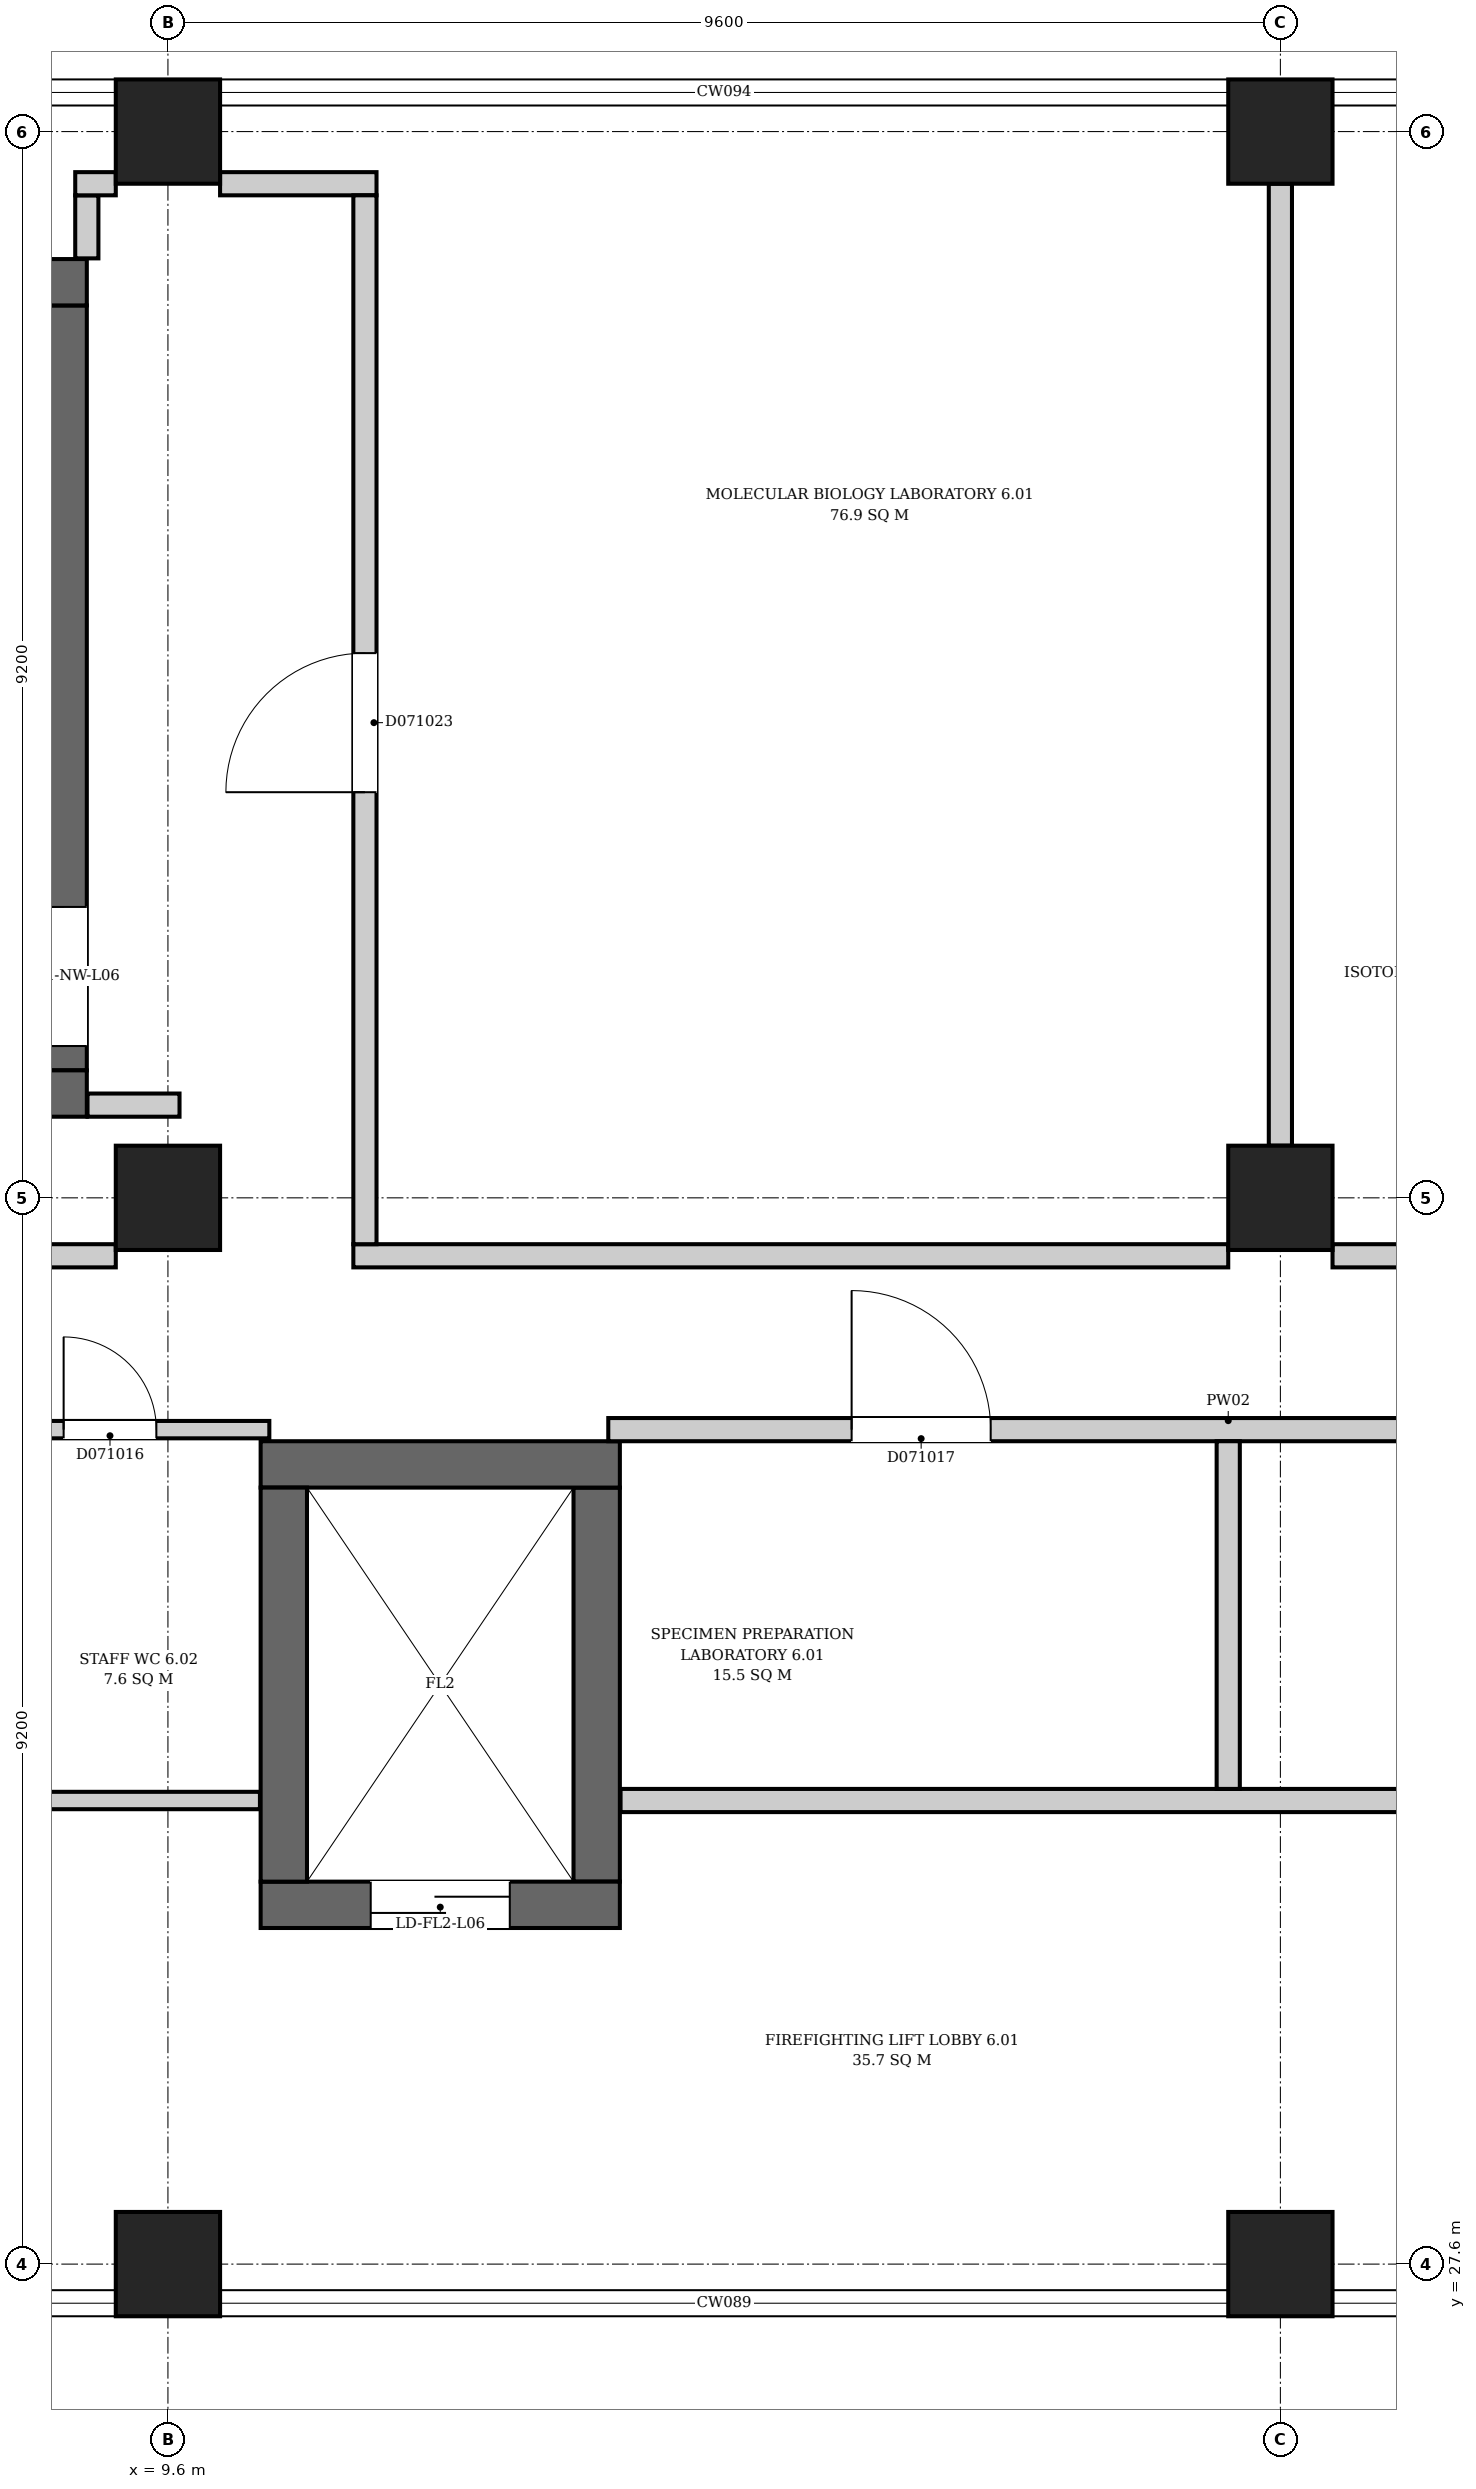
"""IFC4 building model, lengths in metres.
Left out: names, types, materials, properties, quantities, classifications, styles, units other than length and angle.
Written with IfcOpenShell. Run it as: python <this file> out.ifc"""

import sys

from ifc_helpers import new_model, si_unit, direction, frame, frame_2d, origin, origin_2d, place, context, subcontext, project, spatial, rectangle, extrude, element, fill, save


model = new_model("IFC4")
c1 = context("Model", 3, precision=1e-05, world=origin(), true_north=direction((0.0, 1.0)))
c2 = subcontext(c1, "Body", "Model", "MODEL_VIEW")
j1 = project(units=[si_unit("LENGTHUNIT", "METRE"), si_unit("PLANEANGLEUNIT", "RADIAN")], contexts=[c1])
p1 = place(None, origin())
s1 = spatial("IfcSite", under=j1, at=p1, CompositionType="ELEMENT")
p2 = place(p1, origin())
s2 = spatial("IfcBuilding", under=s1, at=p2, CompositionType="ELEMENT")
p3 = place(p2, frame((0.0, 0.0, 36.1)))
s3 = spatial("IfcBuildingStorey", under=s2, at=p3, CompositionType="ELEMENT", Elevation=36.1)
for number, where, z_axis, x_axis in (
    (1, (4.7, 37.7, 0.0), (0.0, 0.0, 1.0), (1.0, 0.0, 0.0)),
    (2, (4.7, 44.7, 0.0), (0.0, 0.0, 1.0), (1.0, 0.0, 0.0)),
):
    element("IfcWall", number, at=place(p3, frame(where, z_axis=z_axis, x_axis=x_axis)), inside=s3, PredefinedType="SHEAR", context=c2, shape_type="SweptSolid", body=[
        extrude(rectangle(XDim=4.2, YDim=0.4, at=frame_2d((2.1, 0.0))), origin(), (0.0, 0.0, 1.0), 4.2),
    ])
p4 = place(p3, frame((8.7, 37.9, 0.0), z_axis=(0.0, 0.0, 1.0), x_axis=(0.0, 1.0, 0.0)))
e3 = element("IfcWall", 3, at=p4, inside=s3, PredefinedType="SHEAR", context=c2, shape_type="SweptSolid", body=[
    extrude(rectangle(XDim=6.6, YDim=0.4, at=frame_2d((3.3, 0.0))), origin(), (0.0, 0.0, 1.0), 4.2),
])
p5 = place(p4, frame((0.21, 0.0, 0.0)))
e4 = element("IfcOpeningElement", 4, at=p5, cuts=e3, PredefinedType="OPENING", context=c2, shape_type="SweptSolid", body=[
    extrude(rectangle(XDim=1.2, YDim=2.1, at=frame_2d((0.6, 1.05))), frame((0.0, 0.21, 0.0), z_axis=(0.0, -1.0, 0.0), x_axis=(1.0, 0.0, 0.0)), (0.0, 0.0, 1.0), 0.42),
])
p6 = place(p3, frame((10.4, 30.7, 0.0), z_axis=(0.0, 0.0, 1.0), x_axis=(1.0, 0.0, 0.0)))
e5 = element("IfcWall", 5, at=p6, inside=s3, PredefinedType="SHEAR", context=c2, shape_type="SweptSolid", body=[
    extrude(rectangle(XDim=3.1, YDim=0.4, at=frame_2d((1.55, 0.0))), origin(), (0.0, 0.0, 1.0), 4.2),
])
p7 = place(p6, frame((0.95, 0.0, 0.0)))
e6 = element("IfcOpeningElement", 6, at=p7, cuts=e5, PredefinedType="OPENING", context=c2, shape_type="SweptSolid", body=[
    extrude(rectangle(XDim=1.2, YDim=2.1, at=frame_2d((0.6, 1.05))), frame((0.0, 0.21, 0.0), z_axis=(0.0, -1.0, 0.0), x_axis=(1.0, 0.0, 0.0)), (0.0, 0.0, 1.0), 0.42),
])
p8 = place(p3, frame((10.4, 34.5, 0.0), z_axis=(0.0, 0.0, 1.0), x_axis=(1.0, 0.0, 0.0)))
e7 = element("IfcWall", 7, at=p8, inside=s3, PredefinedType="SHEAR", context=c2, shape_type="SweptSolid", body=[
    extrude(rectangle(XDim=3.1, YDim=0.4, at=frame_2d((1.55, 0.0))), origin(), (0.0, 0.0, 1.0), 4.2),
])
for number, where, z_axis, x_axis in (
    (8, (10.6, 30.9, 0.0), (0.0, 0.0, 1.0), (0.0, 1.0, 0.0)),
    (9, (13.3, 30.9, 0.0), (0.0, 0.0, 1.0), (0.0, 1.0, 0.0)),
):
    element("IfcWall", number, at=place(p3, frame(where, z_axis=z_axis, x_axis=x_axis)), inside=s3, PredefinedType="SHEAR", context=c2, shape_type="SweptSolid", body=[
        extrude(rectangle(XDim=3.4, YDim=0.4, at=frame_2d((1.7, 0.0))), origin(), (0.0, 0.0, 1.0), 4.2),
    ])
for number, where, z_axis, x_axis in (
    (10, (9.6, 27.6, 0.0), (0.0, 0.0, 1.0), (1.0, 0.0, 0.0)),
    (11, (19.2, 27.6, 0.0), (0.0, 0.0, 1.0), (1.0, 0.0, 0.0)),
    (12, (9.6, 36.8, 0.0), (0.0, 0.0, 1.0), (1.0, 0.0, 0.0)),
    (13, (19.2, 36.8, 0.0), (0.0, 0.0, 1.0), (1.0, 0.0, 0.0)),
    (14, (9.6, 46.0, 0.0), (0.0, 0.0, 1.0), (1.0, 0.0, 0.0)),
    (15, (19.2, 46.0, 0.0), (0.0, 0.0, 1.0), (1.0, 0.0, 0.0)),
):
    element("IfcColumn", number, at=place(p3, frame(where, z_axis=z_axis, x_axis=x_axis)), inside=s3, PredefinedType="COLUMN", context=c2, shape_type="SweptSolid", body=[
        extrude(rectangle(XDim=0.9, YDim=0.9, at=origin_2d()), origin(), (0.0, 0.0, 1.0), 4.2),
    ])
p9 = place(p3, frame((0.056, 31.6, 0.0), z_axis=(0.0, 0.0, 1.0), x_axis=(1.0, 0.0, 0.0)))
e16 = element("IfcWall", 16, at=p9, inside=s3, PredefinedType="PARTITIONING", context=c2, shape_type="SweptSolid", body=[
    extrude(rectangle(XDim=10.338, YDim=0.15, at=frame_2d((5.169, 0.0))), origin(), (0.0, 0.0, 1.0), 3.9),
])
p10 = place(p3, frame((0.056, 34.8, 0.0), z_axis=(0.0, 0.0, 1.0), x_axis=(1.0, 0.0, 0.0)))
e17 = element("IfcWall", 17, at=p10, inside=s3, PredefinedType="PARTITIONING", context=c2, shape_type="SweptSolid", body=[
    extrude(rectangle(XDim=10.419, YDim=0.15, at=frame_2d((5.209, 0.0))), origin(), (0.0, 0.0, 1.0), 3.9),
])
p11 = place(p10, frame((0.794, 0.0, 0.0)))
e18 = element("IfcOpeningElement", 18, at=p11, cuts=e17, PredefinedType="OPENING", context=c2, shape_type="SweptSolid", body=[
    extrude(rectangle(XDim=0.9, YDim=2.1, at=frame_2d((0.45, 1.05))), frame((0.0, 0.085, 0.0), z_axis=(0.0, -1.0, 0.0), x_axis=(1.0, 0.0, 0.0)), (0.0, 0.0, 1.0), 0.17),
])
p12 = place(p10, frame((3.394, 0.0, 0.0)))
e19 = element("IfcOpeningElement", 19, at=p12, cuts=e17, PredefinedType="OPENING", context=c2, shape_type="SweptSolid", body=[
    extrude(rectangle(XDim=0.8, YDim=2.1, at=frame_2d((0.4, 1.05))), frame((0.0, 0.085, 0.0), z_axis=(0.0, -1.0, 0.0), x_axis=(1.0, 0.0, 0.0)), (0.0, 0.0, 1.0), 0.17),
])
p13 = place(p10, frame((6.094, 0.0, 0.0)))
e20 = element("IfcOpeningElement", 20, at=p13, cuts=e17, PredefinedType="OPENING", context=c2, shape_type="SweptSolid", body=[
    extrude(rectangle(XDim=0.7, YDim=2.1, at=frame_2d((0.35, 1.05))), frame((0.0, 0.085, 0.0), z_axis=(0.0, -1.0, 0.0), x_axis=(1.0, 0.0, 0.0)), (0.0, 0.0, 1.0), 0.17),
])
p14 = place(p10, frame((8.644, 0.0, 0.0)))
e21 = element("IfcOpeningElement", 21, at=p14, cuts=e17, PredefinedType="OPENING", context=c2, shape_type="SweptSolid", body=[
    extrude(rectangle(XDim=0.8, YDim=2.1, at=frame_2d((0.4, 1.05))), frame((0.0, 0.085, 0.0), z_axis=(0.0, -1.0, 0.0), x_axis=(1.0, 0.0, 0.0)), (0.0, 0.0, 1.0), 0.17),
])
p15 = place(p3, frame((0.7, 36.3, 0.0), z_axis=(0.0, 0.0, 1.0), x_axis=(1.0, 0.0, 0.0)))
e22 = element("IfcWall", 22, at=p15, inside=s3, PredefinedType="PARTITIONING", context=c2, shape_type="SweptSolid", body=[
    extrude(rectangle(XDim=8.45, YDim=0.2, at=frame_2d((4.225, 0.0))), origin(), (0.0, 0.0, 1.0), 3.9),
])
p16 = place(p15, frame((2.8, 0.0, 0.0)))
e23 = element("IfcOpeningElement", 23, at=p16, cuts=e22, PredefinedType="OPENING", context=c2, shape_type="SweptSolid", body=[
    extrude(rectangle(XDim=1.2, YDim=2.1, at=frame_2d((0.6, 1.05))), frame((0.0, 0.11, 0.0), z_axis=(0.0, -1.0, 0.0), x_axis=(1.0, 0.0, 0.0)), (0.0, 0.0, 1.0), 0.22),
])
p17 = place(p3, frame((8.9, 44.906, 0.0), z_axis=(0.0, 0.0, 1.0), x_axis=(0.0, 1.0, 0.0)))
e24 = element("IfcWall", 24, at=p17, inside=s3, PredefinedType="PARTITIONING", context=c2, shape_type="SweptSolid", body=[
    extrude(rectangle(XDim=0.544, YDim=0.2, at=frame_2d((0.272, 0.0))), origin(), (0.0, 0.0, 1.0), 3.9),
])
p18 = place(p3, frame((8.8, 45.55, 0.0), z_axis=(0.0, 0.0, 1.0), x_axis=(1.0, 0.0, 0.0)))
e25 = element("IfcWall", 25, at=p18, inside=s3, PredefinedType="PARTITIONING", context=c2, shape_type="SweptSolid", body=[
    extrude(rectangle(XDim=0.35, YDim=0.2, at=frame_2d((0.175, 0.0))), origin(), (0.0, 0.0, 1.0), 3.9),
])
p19 = place(p3, frame((8.906, 37.6, 0.0), z_axis=(0.0, 0.0, 1.0), x_axis=(1.0, 0.0, 0.0)))
e26 = element("IfcWall", 26, at=p19, inside=s3, PredefinedType="PARTITIONING", context=c2, shape_type="SweptSolid", body=[
    extrude(rectangle(XDim=0.794, YDim=0.2, at=frame_2d((0.397, 0.0))), origin(), (0.0, 0.0, 1.0), 3.9),
])
p20 = place(p3, frame((10.05, 45.55, 0.0), z_axis=(0.0, 0.0, 1.0), x_axis=(1.0, 0.0, 0.0)))
e27 = element("IfcWall", 27, at=p20, inside=s3, PredefinedType="PARTITIONING", context=c2, shape_type="SweptSolid", body=[
    extrude(rectangle(XDim=1.35, YDim=0.2, at=frame_2d((0.675, 0.0))), origin(), (0.0, 0.0, 1.0), 3.9),
])
p21 = place(p3, frame((11.2, 36.3, 0.0), z_axis=(0.0, 0.0, 1.0), x_axis=(1.0, 0.0, 0.0)))
e28 = element("IfcWall", 28, at=p21, inside=s3, PredefinedType="PARTITIONING", context=c2, shape_type="SweptSolid", body=[
    extrude(rectangle(XDim=7.55, YDim=0.2, at=frame_2d((3.775, 0.0))), origin(), (0.0, 0.0, 1.0), 3.9),
])
p22 = place(p3, frame((11.3, 36.4, 0.0), z_axis=(0.0, 0.0, 1.0), x_axis=(0.0, 1.0, 0.0)))
e29 = element("IfcWall", 29, at=p22, inside=s3, PredefinedType="PARTITIONING", context=c2, shape_type="SweptSolid", body=[
    extrude(rectangle(XDim=9.05, YDim=0.2, at=frame_2d((4.525, 0.0))), origin(), (0.0, 0.0, 1.0), 3.9),
])
p23 = place(p22, frame((3.9, 0.0, 0.0)))
e30 = element("IfcOpeningElement", 30, at=p23, cuts=e29, PredefinedType="OPENING", context=c2, shape_type="SweptSolid", body=[
    extrude(rectangle(XDim=1.2, YDim=2.1, at=frame_2d((0.6, 1.05))), frame((0.0, 0.11, 0.0), z_axis=(0.0, -1.0, 0.0), x_axis=(1.0, 0.0, 0.0)), (0.0, 0.0, 1.0), 0.22),
])
p24 = place(p3, frame((13.4, 34.8, 0.0), z_axis=(0.0, 0.0, 1.0), x_axis=(1.0, 0.0, 0.0)))
e31 = element("IfcWall", 31, at=p24, inside=s3, PredefinedType="PARTITIONING", context=c2, shape_type="SweptSolid", body=[
    extrude(rectangle(XDim=10.7, YDim=0.2, at=frame_2d((5.35, 0.0))), origin(), (0.0, 0.0, 1.0), 3.9),
])
p25 = place(p24, frame((2.1, 0.0, 0.0)))
e32 = element("IfcOpeningElement", 32, at=p25, cuts=e31, PredefinedType="OPENING", context=c2, shape_type="SweptSolid", body=[
    extrude(rectangle(XDim=1.2, YDim=2.1, at=frame_2d((0.6, 1.05))), frame((0.0, 0.11, 0.0), z_axis=(0.0, -1.0, 0.0), x_axis=(1.0, 0.0, 0.0)), (0.0, 0.0, 1.0), 0.22),
])
p26 = place(p24, frame((7.35, 0.0, 0.0)))
e33 = element("IfcOpeningElement", 33, at=p26, cuts=e31, PredefinedType="OPENING", context=c2, shape_type="SweptSolid", body=[
    extrude(rectangle(XDim=1.2, YDim=2.1, at=frame_2d((0.6, 1.05))), frame((0.0, 0.11, 0.0), z_axis=(0.0, -1.0, 0.0), x_axis=(1.0, 0.0, 0.0)), (0.0, 0.0, 1.0), 0.22),
])
p27 = place(p3, frame((13.506, 31.6, 0.0), z_axis=(0.0, 0.0, 1.0), x_axis=(1.0, 0.0, 0.0)))
e34 = element("IfcWall", 34, at=p27, inside=s3, PredefinedType="PARTITIONING", context=c2, shape_type="SweptSolid", body=[
    extrude(rectangle(XDim=10.594, YDim=0.2, at=frame_2d((5.297, 0.0))), origin(), (0.0, 0.0, 1.0), 3.9),
])
p28 = place(p3, frame((18.75, 31.7, 0.0), z_axis=(0.0, 0.0, 1.0), x_axis=(0.0, 1.0, 0.0)))
e35 = element("IfcWall", 35, at=p28, inside=s3, PredefinedType="PARTITIONING", context=c2, shape_type="SweptSolid", body=[
    extrude(rectangle(XDim=3.0, YDim=0.2, at=frame_2d((1.5, 0.0))), origin(), (0.0, 0.0, 1.0), 3.9),
])
p29 = place(p3, frame((19.2, 37.25, 0.0), z_axis=(0.0, 0.0, 1.0), x_axis=(0.0, 1.0, 0.0)))
e36 = element("IfcWall", 36, at=p29, inside=s3, PredefinedType="PARTITIONING", context=c2, shape_type="SweptSolid", body=[
    extrude(rectangle(XDim=8.3, YDim=0.2, at=frame_2d((4.15, 0.0))), origin(), (0.0, 0.0, 1.0), 3.9),
])
p30 = place(p3, frame((19.65, 36.3, 0.0), z_axis=(0.0, 0.0, 1.0), x_axis=(1.0, 0.0, 0.0)))
e37 = element("IfcWall", 37, at=p30, inside=s3, PredefinedType="PARTITIONING", context=c2, shape_type="SweptSolid", body=[
    extrude(rectangle(XDim=2.65, YDim=0.2, at=frame_2d((1.325, 0.0))), origin(), (0.0, 0.0, 1.0), 3.9),
])
p31 = place(p5, origin())
e38 = element("IfcDoor", 38, at=p31, inside=s3, OperationType="SINGLE_SWING_RIGHT", PredefinedType="DOOR", context=c2, shape_type="SweptSolid", body=[
    extrude(rectangle(XDim=1.2, YDim=2.1, at=frame_2d((0.6, 1.05))), frame((0.0, 0.025, 0.0), z_axis=(0.0, -1.0, 0.0), x_axis=(1.0, 0.0, 0.0)), (0.0, 0.0, 1.0), 0.05),
])
fill(e4, e38)
p32 = place(p7, origin())
e39 = element("IfcDoor", 39, at=p32, inside=s3, OperationType="DOUBLE_DOOR_SLIDING", PredefinedType="DOOR", context=c2, shape_type="SweptSolid", body=[
    extrude(rectangle(XDim=1.2, YDim=2.1, at=frame_2d((0.6, 1.05))), frame((0.0, 0.025, 0.0), z_axis=(0.0, -1.0, 0.0), x_axis=(1.0, 0.0, 0.0)), (0.0, 0.0, 1.0), 0.05),
])
fill(e6, e39)
p33 = place(p14, origin())
e40 = element("IfcDoor", 40, at=p33, inside=s3, OperationType="SINGLE_SWING_LEFT", PredefinedType="DOOR", context=c2, shape_type="SweptSolid", body=[
    extrude(rectangle(XDim=0.8, YDim=2.1, at=frame_2d((0.4, 1.05))), frame((0.0, 0.025, 0.0), z_axis=(0.0, -1.0, 0.0), x_axis=(1.0, 0.0, 0.0)), (0.0, 0.0, 1.0), 0.05),
])
fill(e21, e40)
p34 = place(p25, origin())
e41 = element("IfcDoor", 41, at=p34, inside=s3, OperationType="SINGLE_SWING_RIGHT", PredefinedType="DOOR", context=c2, shape_type="SweptSolid", body=[
    extrude(rectangle(XDim=1.2, YDim=2.1, at=frame_2d((0.6, 1.05))), frame((0.0, 0.025, 0.0), z_axis=(0.0, -1.0, 0.0), x_axis=(1.0, 0.0, 0.0)), (0.0, 0.0, 1.0), 0.05),
])
fill(e32, e41)
p35 = place(p23, origin())
e42 = element("IfcDoor", 42, at=p35, inside=s3, OperationType="SINGLE_SWING_LEFT", PredefinedType="DOOR", context=c2, shape_type="SweptSolid", body=[
    extrude(rectangle(XDim=1.2, YDim=2.1, at=frame_2d((0.6, 1.05))), frame((0.0, 0.025, 0.0), z_axis=(0.0, -1.0, 0.0), x_axis=(1.0, 0.0, 0.0)), (0.0, 0.0, 1.0), 0.05),
])
fill(e30, e42)
save(model, sys.argv[1])
